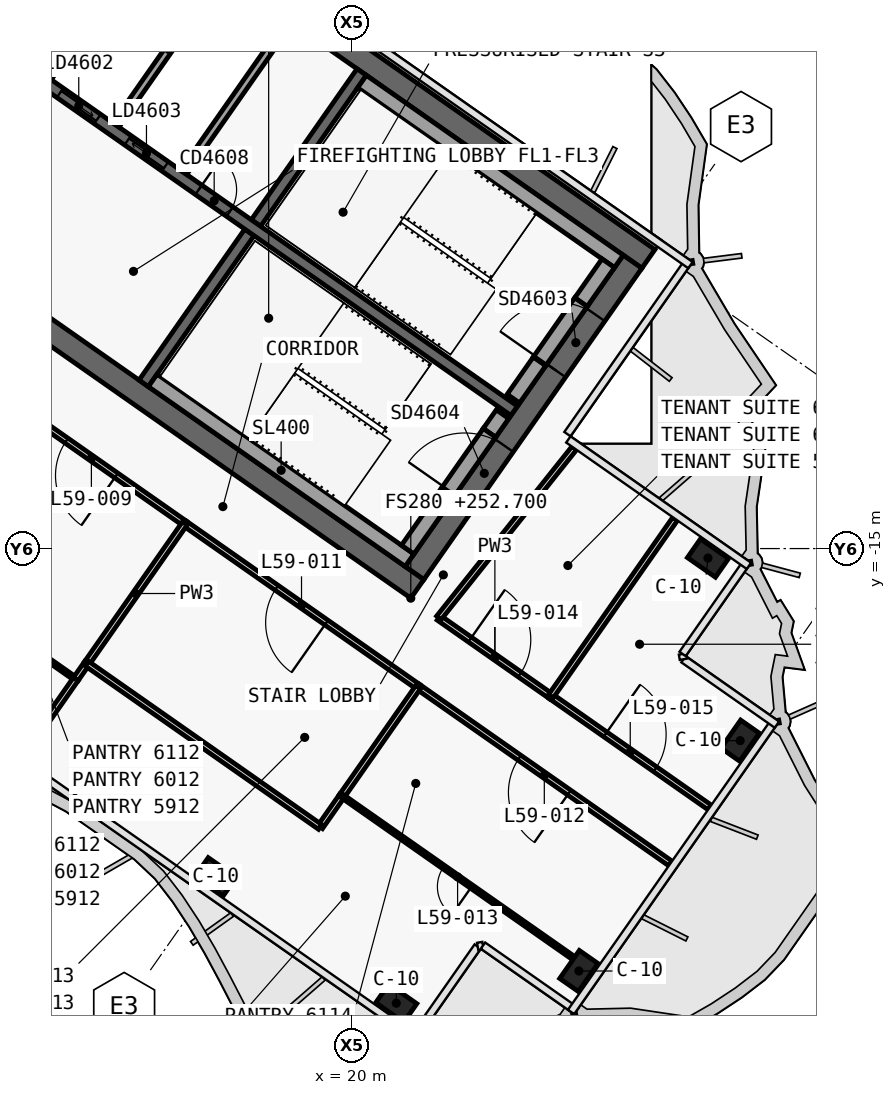
"""IFC4 building model, lengths in metres.
Left out: names, types, materials, properties, quantities, classifications, styles, units other than length and angle.
Written with IfcOpenShell. Run it as: python <this file> out.ifc"""

import sys

from ifc_helpers import new_model, si_unit, direction, frame, frame_2d, origin, origin_2d, place, context, subcontext, project, spatial, polyline, rectangle, outline, extrude, element, fill, save


model = new_model("IFC4")
c1 = context("Model", 3, precision=1e-05, world=origin(), true_north=direction((0.0, 1.0)))
c2 = subcontext(c1, "Body", "Model", "MODEL_VIEW")
j1 = project(units=[si_unit("LENGTHUNIT", "METRE"), si_unit("PLANEANGLEUNIT", "RADIAN")], contexts=[c1])
p1 = place(None, origin())
s1 = spatial("IfcSite", under=j1, at=p1, CompositionType="ELEMENT")
p2 = place(p1, origin())
s2 = spatial("IfcBuilding", under=s1, at=p2, CompositionType="ELEMENT")
p3 = place(p2, frame((0.0, 0.0, 252.7)))
s3 = spatial("IfcBuildingStorey", under=s2, at=p3, CompositionType="ELEMENT", Elevation=252.7)
p4 = place(p3, frame((0.028, 12.066, 0.0), z_axis=(0.0, 0.0, 1.0), x_axis=(0.819151382952, -0.573577380837, 0.0)))
e1 = element("IfcWall", 1, at=p4, inside=s3, PredefinedType="SHEAR", context=c2, shape_type="SweptSolid", body=[
    extrude(outline(polyline([(33.898, 0.3), (0.0, 0.3), (0.42, -0.3), (33.898, -0.3), (33.898, 0.3)])), origin(), (0.0, 0.0, 1.0), 3.9),
])
p5 = place(p3, frame((0.028, -0.874, 0.0), z_axis=(0.0, 0.0, 1.0), x_axis=(0.819150035022, -0.573579305871, 0.0)))
e2 = element("IfcWall", 2, at=p5, inside=s3, PredefinedType="SHEAR", context=c2, shape_type="SweptSolid", body=[
    extrude(outline(polyline([(26.476, 0.3), (0.0, 0.3), (0.42, -0.3), (26.476, -0.3), (26.476, 0.3)])), origin(), (0.0, 0.0, 1.0), 3.9),
])
p6 = place(p5, frame((0.826, 0.0, 0.0)))
e3 = element("IfcOpeningElement", 3, at=p6, cuts=e2, PredefinedType="OPENING", context=c2, shape_type="SweptSolid", body=[
    extrude(rectangle(XDim=1.5, YDim=2.1, at=frame_2d((0.75, 1.05))), frame((0.0, 0.31, 0.0), z_axis=(0.0, -1.0, 0.0), x_axis=(1.0, 0.0, 0.0)), (0.0, 0.0, 1.0), 0.62),
])
p7 = place(p5, frame((12.226, 0.0, 0.0)))
e4 = element("IfcOpeningElement", 4, at=p7, cuts=e2, PredefinedType="OPENING", context=c2, shape_type="SweptSolid", body=[
    extrude(rectangle(XDim=1.5, YDim=2.1, at=frame_2d((0.75, 1.05))), frame((0.0, 0.31, 0.0), z_axis=(0.0, -1.0, 0.0), x_axis=(1.0, 0.0, 0.0)), (0.0, 0.0, 1.0), 0.62),
])
p8 = place(p3, frame((21.642, -15.642, 0.0), z_axis=(0.0, 0.0, 1.0), x_axis=(0.573586866468, 0.819144740944, 0.0)))
e5 = element("IfcWall", 5, at=p8, inside=s3, PredefinedType="SHEAR", context=c2, shape_type="SweptSolid", body=[
    extrude(outline(polyline([(10.0, 0.3), (0.0, 0.3), (0.0, -0.3), (10.0, -0.3), (10.0, 0.3)])), origin(), (0.0, 0.0, 1.0), 3.9),
])
p9 = place(p8, frame((6.5, 0.0, 0.0)))
e6 = element("IfcOpeningElement", 6, at=p9, cuts=e5, PredefinedType="OPENING", context=c2, shape_type="SweptSolid", body=[
    extrude(rectangle(XDim=1.8, YDim=2.1, at=frame_2d((0.9, 1.05))), frame((0.0, 0.31, 0.0), z_axis=(0.0, -1.0, 0.0), x_axis=(1.0, 0.0, 0.0)), (0.0, 0.0, 1.0), 0.62),
])
p10 = place(p8, frame((2.3, 0.0, 0.0)))
e7 = element("IfcOpeningElement", 7, at=p10, cuts=e5, PredefinedType="OPENING", context=c2, shape_type="SweptSolid", body=[
    extrude(rectangle(XDim=1.8, YDim=2.1, at=frame_2d((0.9, 1.05))), frame((0.0, 0.31, 0.0), z_axis=(0.0, -1.0, 0.0), x_axis=(1.0, 0.0, 0.0)), (0.0, 0.0, 1.0), 0.62),
])
p11 = place(p3, frame((14.515, -10.652, 0.0), z_axis=(0.0, 0.0, 1.0), x_axis=(0.573560315113, 0.819163332265, 0.0)))
e8 = element("IfcWall", 8, at=p11, inside=s3, PredefinedType="SHEAR", context=c2, shape_type="SweptSolid", body=[
    extrude(outline(polyline([(0.0, 0.15), (0.0, -0.15), (4.85, -0.15), (4.85, 0.15), (0.0, 0.15)])), origin(), (0.0, 0.0, 1.0), 3.9),
])
p12 = place(p3, frame((17.469, -6.433, 0.0), z_axis=(0.0, 0.0, 1.0), x_axis=(0.573594092424, 0.81913968109, 0.0)))
e9 = element("IfcWall", 9, at=p12, inside=s3, PredefinedType="SHEAR", context=c2, shape_type="SweptSolid", body=[
    extrude(outline(polyline([(4.85, -0.15), (4.85, 0.15), (0.0, 0.15), (0.0, -0.15), (4.85, -0.15)])), origin(), (0.0, 0.0, 1.0), 3.9),
])
p13 = place(p3, frame((2.638, 3.768, 0.0), z_axis=(0.0, 0.0, 1.0), x_axis=(0.819155014212, -0.573572194837, 0.0)))
e10 = element("IfcWall", 10, at=p13, inside=s3, PredefinedType="SHEAR", context=c2, shape_type="SweptSolid", body=[
    extrude(outline(polyline([(0.0, 0.15), (0.0, -0.15), (26.4, -0.15), (26.4, 0.15), (0.0, 0.15)])), origin(), (0.0, 0.0, 1.0), 3.9),
])
p14 = place(p13, frame((9.637, 0.0, 0.0)))
e11 = element("IfcOpeningElement", 11, at=p14, cuts=e10, PredefinedType="OPENING", context=c2, shape_type="SweptSolid", body=[
    extrude(rectangle(XDim=1.2, YDim=2.1, at=frame_2d((0.6, 1.05))), frame((0.0, 0.16, 0.0), z_axis=(0.0, -1.0, 0.0), x_axis=(1.0, 0.0, 0.0)), (0.0, 0.0, 1.0), 0.32),
])
p15 = place(p13, frame((11.812, 0.0, 0.0)))
e12 = element("IfcOpeningElement", 12, at=p15, cuts=e10, PredefinedType="OPENING", context=c2, shape_type="SweptSolid", body=[
    extrude(rectangle(XDim=1.2, YDim=2.1, at=frame_2d((0.6, 1.05))), frame((0.0, 0.16, 0.0), z_axis=(0.0, -1.0, 0.0), x_axis=(1.0, 0.0, 0.0)), (0.0, 0.0, 1.0), 0.32),
])
p16 = place(p13, frame((13.988, 0.0, 0.0)))
e13 = element("IfcOpeningElement", 13, at=p16, cuts=e10, PredefinedType="OPENING", context=c2, shape_type="SweptSolid", body=[
    extrude(rectangle(XDim=1.2, YDim=2.1, at=frame_2d((0.6, 1.05))), frame((0.0, 0.16, 0.0), z_axis=(0.0, -1.0, 0.0), x_axis=(1.0, 0.0, 0.0)), (0.0, 0.0, 1.0), 0.32),
])
p17 = place(p13, frame((16.262, 0.0, 0.0)))
e14 = element("IfcOpeningElement", 14, at=p17, cuts=e10, PredefinedType="OPENING", context=c2, shape_type="SweptSolid", body=[
    extrude(rectangle(XDim=1.0, YDim=2.1, at=frame_2d((0.5, 1.05))), frame((0.0, 0.16, 0.0), z_axis=(0.0, -1.0, 0.0), x_axis=(1.0, 0.0, 0.0)), (0.0, 0.0, 1.0), 0.32),
])
for number, where, z_axis, x_axis in (
    (15, (16.41, -23.637, 0.0), (0.0, 0.0, 1.0), (0.819, -0.574, 0.0)),
    (16, (21.161, -26.964, 0.0), (0.0, 0.0, 1.0), (0.819, -0.574, 0.0)),
    (17, (29.363, -15.25, 0.0), (0.0, 0.0, 1.0), (0.819, -0.574, 0.0)),
    (18, (25.966, -26.117, 0.0), (0.0, 0.0, 1.0), (0.574, 0.819, 0.0)),
    (19, (30.21, -20.055, 0.0), (0.0, 0.0, 1.0), (0.574, 0.819, 0.0)),
):
    element("IfcColumn", number, at=place(p3, frame(where, z_axis=z_axis, x_axis=x_axis)), inside=s3, PredefinedType="COLUMN", context=c2, shape_type="SweptSolid", body=[
        extrude(rectangle(XDim=0.9, YDim=0.6, at=origin_2d()), origin(), (0.0, 0.0, 1.0), 3.9),
    ])
p18 = place(p3, frame((12.001, -2.605, 0.0), z_axis=(0.0, 0.0, 1.0), x_axis=(0.573560315113, 0.819163332265, 0.0)))
e20 = element("IfcWall", 20, at=p18, inside=s3, PredefinedType="SOLIDWALL", context=c2, shape_type="SweptSolid", body=[
    extrude(rectangle(XDim=4.85, YDim=0.2, at=frame_2d((2.425, 0.0))), origin(), (0.0, 0.0, 1.0), 3.9),
])
p19 = place(p3, frame((13.783, -3.852, 0.0), z_axis=(0.0, 0.0, 1.0), x_axis=(0.573594092424, 0.81913968109, 0.0)))
e21 = element("IfcWall", 21, at=p19, inside=s3, PredefinedType="SOLIDWALL", context=c2, shape_type="SweptSolid", body=[
    extrude(rectangle(XDim=4.85, YDim=0.2, at=frame_2d((2.425, 0.0))), origin(), (0.0, 0.0, 1.0), 3.9),
])
p20 = place(p3, frame((15.565, -5.1, 0.0), z_axis=(0.0, 0.0, 1.0), x_axis=(0.573560315113, 0.819163332265, 0.0)))
e22 = element("IfcWall", 22, at=p20, inside=s3, PredefinedType="SOLIDWALL", context=c2, shape_type="SweptSolid", body=[
    extrude(rectangle(XDim=4.85, YDim=0.2, at=frame_2d((2.425, 0.0))), origin(), (0.0, 0.0, 1.0), 3.9),
])
p21 = place(p3, frame((20.259, -2.71, 0.0), z_axis=(0.0, 0.0, 1.0), x_axis=(0.81914849389, -0.573581506813, 0.0)))
e23 = element("IfcWall", 23, at=p21, inside=s3, PredefinedType="SOLIDWALL", context=c2, shape_type="SweptSolid", body=[
    extrude(rectangle(XDim=8.25, YDim=0.4, at=frame_2d((4.125, 0.0))), origin(), (0.0, 0.0, 1.0), 3.62),
])
p22 = place(p3, frame((24.244, -11.055, 0.0), z_axis=(0.0, 0.0, 1.0), x_axis=(0.573571582932, 0.819155442668, 0.0)))
e24 = element("IfcWall", 24, at=p22, inside=s3, PredefinedType="SOLIDWALL", context=c2, shape_type="SweptSolid", body=[
    extrude(rectangle(XDim=1.2, YDim=0.4, at=frame_2d((0.6, 0.0))), origin(), (0.0, 0.0, 1.0), 3.62),
])
p23 = place(p3, frame((26.022, -8.515, 0.0), z_axis=(0.0, 0.0, 1.0), x_axis=(0.573619628835, 0.819121798889, 0.0)))
e25 = element("IfcWall", 25, at=p23, inside=s3, PredefinedType="SOLIDWALL", context=c2, shape_type="SweptSolid", body=[
    extrude(rectangle(XDim=1.25, YDim=0.4, at=frame_2d((0.625, 0.0))), origin(), (0.0, 0.0, 1.0), 3.62),
])
p24 = place(p3, frame((24.932, -10.072, 2.15), z_axis=(0.0, 0.0, 1.0), x_axis=(0.573591692345, 0.819141361715, 0.0)))
e26 = element("IfcWall", 26, at=p24, inside=s3, PredefinedType="SOLIDWALL", context=c2, shape_type="SweptSolid", body=[
    extrude(rectangle(XDim=1.9, YDim=0.4, at=frame_2d((0.95, 0.0))), origin(), (0.0, 0.0, 1.0), 1.47),
])
p25 = place(p3, frame((14.753, -10.574, 0.0), z_axis=(0.0, 0.0, 1.0), x_axis=(0.819158229677, -0.573567602601, 0.0)))
e27 = element("IfcWall", 27, at=p25, inside=s3, PredefinedType="SOLIDWALL", context=c2, shape_type="SweptSolid", body=[
    extrude(rectangle(XDim=8.25, YDim=0.4, at=frame_2d((4.125, 0.0))), origin(), (0.0, 0.0, 1.0), 3.62),
])
p26 = place(p3, frame((21.462, -15.028, 0.0), z_axis=(0.0, 0.0, 1.0), x_axis=(0.573559770908, 0.819163713305, 0.0)))
e28 = element("IfcWall", 28, at=p26, inside=s3, PredefinedType="SOLIDWALL", context=c2, shape_type="SweptSolid", body=[
    extrude(rectangle(XDim=1.85, YDim=0.4, at=frame_2d((0.925, 0.0))), origin(), (0.0, 0.0, 1.0), 3.62),
])
p27 = place(p3, frame((23.613, -11.956, 0.0), z_axis=(0.0, 0.0, 1.0), x_axis=(0.573435029941, 0.819251039936, 0.0)))
e29 = element("IfcWall", 29, at=p27, inside=s3, PredefinedType="SOLIDWALL", context=c2, shape_type="SweptSolid", body=[
    extrude(rectangle(XDim=0.6, YDim=0.4, at=frame_2d((0.3, 0.0))), origin(), (0.0, 0.0, 1.0), 3.62),
])
p28 = place(p3, frame((22.523, -13.512, 2.15), z_axis=(0.0, 0.0, 1.0), x_axis=(0.573591692345, 0.819141361715, 0.0)))
e30 = element("IfcWall", 30, at=p28, inside=s3, PredefinedType="SOLIDWALL", context=c2, shape_type="SweptSolid", body=[
    extrude(rectangle(XDim=1.9, YDim=0.4, at=frame_2d((0.95, 0.0))), origin(), (0.0, 0.0, 1.0), 1.47),
])
p29 = place(p3, frame((22.281, -16.822, 0.0), z_axis=(0.0, 0.0, 1.0), x_axis=(0.819165052243, -0.573557858619, 0.0)))
e31 = element("IfcWall", 31, at=p29, inside=s3, PredefinedType="PARTITIONING", context=c2, shape_type="SweptSolid", body=[
    extrude(rectangle(XDim=3.602, YDim=0.15, at=frame_2d((1.801, 0.0))), origin(), (0.0, 0.0, 1.0), 3.62),
])
p30 = place(p29, frame((1.001, 0.0, 0.0)))
e32 = element("IfcOpeningElement", 32, at=p30, cuts=e31, PredefinedType="OPENING", context=c2, shape_type="SweptSolid", body=[
    extrude(rectangle(XDim=1.6, YDim=2.1, at=frame_2d((0.8, 1.05))), frame((0.0, 0.085, 0.0), z_axis=(0.0, -1.0, 0.0), x_axis=(1.0, 0.0, 0.0)), (0.0, 0.0, 1.0), 0.17),
])
p31 = place(p3, frame((25.228, -18.886, 0.0), z_axis=(0.0, 0.0, 1.0), x_axis=(0.819171218287, -0.57354905207, 0.0)))
e33 = element("IfcWall", 33, at=p31, inside=s3, PredefinedType="PARTITIONING", context=c2, shape_type="SweptSolid", body=[
    extrude(rectangle(XDim=5.102, YDim=0.15, at=frame_2d((2.551, 0.0))), origin(), (0.0, 0.0, 1.0), 3.0),
])
p32 = place(p31, frame((1.751, 0.0, 0.0)))
e34 = element("IfcOpeningElement", 34, at=p32, cuts=e33, PredefinedType="OPENING", context=c2, shape_type="SweptSolid", body=[
    extrude(rectangle(XDim=1.6, YDim=2.1, at=frame_2d((0.8, 1.05))), frame((0.0, 0.085, 0.0), z_axis=(0.0, -1.0, 0.0), x_axis=(1.0, 0.0, 0.0)), (0.0, 0.0, 1.0), 0.17),
])
p33 = place(p3, frame((15.598, -14.34, 0.0), z_axis=(0.0, 0.0, 1.0), x_axis=(-0.819145946981, 0.573585144111, 0.0)))
e35 = element("IfcWall", 35, at=p33, inside=s3, PredefinedType="PARTITIONING", context=c2, shape_type="SweptSolid", body=[
    extrude(rectangle(XDim=6.004, YDim=0.15, at=frame_2d((3.002, 0.0))), origin(), (0.0, 0.0, 1.0), 3.05),
])
p34 = place(p33, frame((2.202, 0.0, 0.0)))
e36 = element("IfcOpeningElement", 36, at=p34, cuts=e35, PredefinedType="OPENING", context=c2, shape_type="SweptSolid", body=[
    extrude(rectangle(XDim=1.6, YDim=2.1, at=frame_2d((0.8, 1.05))), frame((0.0, 0.085, 0.0), z_axis=(0.0, -1.0, 0.0), x_axis=(1.0, 0.0, 0.0)), (0.0, 0.0, 1.0), 0.17),
])
p35 = place(p3, frame((21.741, -18.642, 0.0), z_axis=(0.0, 0.0, 1.0), x_axis=(-0.819164661457, 0.573558416746, 0.0)))
e37 = element("IfcWall", 37, at=p35, inside=s3, PredefinedType="PARTITIONING", context=c2, shape_type="SweptSolid", body=[
    extrude(rectangle(XDim=7.504, YDim=0.15, at=frame_2d((3.752, 0.0))), origin(), (0.0, 0.0, 1.0), 3.05),
])
p36 = place(p35, frame((2.952, 0.0, 0.0)))
e38 = element("IfcOpeningElement", 38, at=p36, cuts=e37, PredefinedType="OPENING", context=c2, shape_type="SweptSolid", body=[
    extrude(rectangle(XDim=1.6, YDim=2.1, at=frame_2d((0.8, 1.05))), frame((0.0, 0.085, 0.0), z_axis=(0.0, -1.0, 0.0), x_axis=(1.0, 0.0, 0.0)), (0.0, 0.0, 1.0), 0.17),
])
p37 = place(p3, frame((28.375, -23.287, 0.0), z_axis=(0.0, 0.0, 1.0), x_axis=(-0.819144140048, 0.573587724611, 0.0)))
e39 = element("IfcWall", 39, at=p37, inside=s3, PredefinedType="PARTITIONING", context=c2, shape_type="SweptSolid", body=[
    extrude(rectangle(XDim=8.102, YDim=0.15, at=frame_2d((4.051, 0.0))), origin(), (0.0, 0.0, 1.0), 3.0),
])
p38 = place(p37, frame((3.251, 0.0, 0.0)))
e40 = element("IfcOpeningElement", 40, at=p38, cuts=e39, PredefinedType="OPENING", context=c2, shape_type="SweptSolid", body=[
    extrude(rectangle(XDim=1.6, YDim=2.1, at=frame_2d((0.8, 1.05))), frame((0.0, 0.085, 0.0), z_axis=(0.0, -1.0, 0.0), x_axis=(1.0, 0.0, 0.0)), (0.0, 0.0, 1.0), 0.17),
])
p39 = place(p3, frame((28.499, -14.218, 0.0), z_axis=(0.0, 0.0, 1.0), x_axis=(-0.573562952056, -0.819161485929, 0.0)))
e41 = element("IfcWall", 41, at=p39, inside=s3, PredefinedType="PARTITIONING", context=c2, shape_type="SweptSolid", body=[
    extrude(rectangle(XDim=5.7, YDim=0.15, at=frame_2d((2.85, 0.0))), origin(), (0.0, 0.0, 1.0), 3.05),
])
p40 = place(p3, frame((22.282, -16.823, 0.0), z_axis=(0.0, 0.0, 1.0), x_axis=(0.623563137477, 0.781772993637, 0.0)))
e42 = element("IfcWall", 42, at=p40, inside=s3, PredefinedType="PARTITIONING", context=c2, shape_type="SweptSolid", body=[
    extrude(rectangle(XDim=5.711, YDim=0.15, at=frame_2d((2.855, 0.0))), origin(), (0.0, 0.0, 1.0), 3.05),
])
p41 = place(p3, frame((12.728, -18.435, 0.0), z_axis=(0.0, 0.0, 1.0), x_axis=(-0.819163097304, 0.573560650686, 0.0)))
e43 = element("IfcWall", 43, at=p41, inside=s3, PredefinedType="PARTITIONING", context=c2, shape_type="SweptSolid", body=[
    extrude(rectangle(XDim=6.0, YDim=0.1, at=frame_2d((3.0, 0.0))), origin(), (0.0, 0.0, 1.0), 3.05),
])
p42 = place(p41, frame((2.55, 0.0, 0.0)))
e44 = element("IfcOpeningElement", 44, at=p42, cuts=e43, PredefinedType="OPENING", context=c2, shape_type="SweptSolid", body=[
    extrude(rectangle(XDim=0.9, YDim=2.1, at=frame_2d((0.45, 1.05))), frame((0.0, 0.06, 0.0), z_axis=(0.0, -1.0, 0.0), x_axis=(1.0, 0.0, 0.0)), (0.0, 0.0, 1.0), 0.12),
])
p43 = place(p3, frame((12.728, -18.435, 0.0), z_axis=(0.0, 0.0, 1.0), x_axis=(-0.573560689761, -0.819163069945, 0.0)))
e45 = element("IfcWall", 45, at=p43, inside=s3, PredefinedType="PARTITIONING", context=c2, shape_type="SweptSolid", body=[
    extrude(rectangle(XDim=2.499, YDim=0.15, at=frame_2d((1.25, 0.0))), origin(), (0.0, 0.0, 1.0), 3.0),
])
p44 = place(p3, frame((15.596, -14.339, 0.0), z_axis=(0.0, 0.0, 1.0), x_axis=(-0.573564243949, -0.819160581365, 0.0)))
e46 = element("IfcWall", 46, at=p44, inside=s3, PredefinedType="PARTITIONING", context=c2, shape_type="SweptSolid", body=[
    extrude(rectangle(XDim=4.502, YDim=0.15, at=frame_2d((2.251, 0.0))), origin(), (0.0, 0.0, 1.0), 3.62),
])
p45 = place(p3, frame((13.016, -18.024, 0.0), z_axis=(0.0, 0.0, 1.0), x_axis=(-0.573560455774, -0.819163233777, 0.0)))
e47 = element("IfcWall", 47, at=p45, inside=s3, PredefinedType="PARTITIONING", context=c2, shape_type="SweptSolid", body=[
    extrude(rectangle(XDim=0.501, YDim=0.15, at=frame_2d((0.25, 0.0))), origin(), (0.0, 0.0, 1.0), 3.62),
])
p46 = place(p3, frame((19.733, -21.507, 0.0), z_axis=(0.0, 0.0, 1.0), x_axis=(-0.573691505171, -0.819071460188, 0.0)))
e48 = element("IfcWall", 48, at=p46, inside=s3, PredefinedType="PARTITIONING", context=c2, shape_type="SweptSolid", body=[
    extrude(rectangle(XDim=1.001, YDim=0.15, at=frame_2d((0.5, 0.0))), origin(), (0.0, 0.0, 1.0), 3.62),
])
p47 = place(p3, frame((19.159, -22.327, 0.0), z_axis=(0.0, 0.0, 1.0), x_axis=(-0.81915238829, 0.573575945067, 0.0)))
e49 = element("IfcWall", 49, at=p47, inside=s3, PredefinedType="PARTITIONING", context=c2, shape_type="SweptSolid", body=[
    extrude(rectangle(XDim=7.5, YDim=0.15, at=frame_2d((3.75, 0.0))), origin(), (0.0, 0.0, 1.0), 3.05),
])
p48 = place(p3, frame((21.74, -18.641, 0.0), z_axis=(0.0, 0.0, 1.0), x_axis=(-0.573555919535, -0.819166409935, 0.0)))
e50 = element("IfcWall", 50, at=p48, inside=s3, PredefinedType="PARTITIONING", context=c2, shape_type="SweptSolid", body=[
    extrude(rectangle(XDim=3.502, YDim=0.15, at=frame_2d((1.751, 0.0))), origin(), (0.0, 0.0, 1.0), 3.05),
])
p49 = place(p3, frame((25.818, -25.77, 0.0), z_axis=(0.0, 0.0, 1.0), x_axis=(-0.819154729426, 0.573572601559, 0.0)))
e51 = element("IfcWall", 51, at=p49, inside=s3, PredefinedType="PARTITIONING", context=c2, shape_type="SweptSolid", body=[
    extrude(rectangle(XDim=7.43, YDim=0.1, at=frame_2d((3.715, 0.0))), origin(), (0.0, 0.0, 1.0), 3.05),
])
p50 = place(p49, frame((3.265, 0.0, 0.0)))
e52 = element("IfcOpeningElement", 52, at=p50, cuts=e51, PredefinedType="OPENING", context=c2, shape_type="SweptSolid", body=[
    extrude(rectangle(XDim=0.9, YDim=2.1, at=frame_2d((0.45, 1.05))), frame((0.0, 0.06, 0.0), z_axis=(0.0, -1.0, 0.0), x_axis=(1.0, 0.0, 0.0)), (0.0, 0.0, 1.0), 0.12),
])
p51 = place(p15, origin())
e53 = element("IfcDoor", 53, at=p51, inside=s3, OperationType="SLIDING_TO_RIGHT", PredefinedType="DOOR", context=c2, shape_type="SweptSolid", body=[
    extrude(rectangle(XDim=1.2, YDim=2.1, at=frame_2d((0.6, 1.05))), frame((0.0, 0.025, 0.0), z_axis=(0.0, -1.0, 0.0), x_axis=(1.0, 0.0, 0.0)), (0.0, 0.0, 1.0), 0.05),
])
fill(e12, e53)
p52 = place(p16, origin())
e54 = element("IfcDoor", 54, at=p52, inside=s3, OperationType="SLIDING_TO_LEFT", PredefinedType="DOOR", context=c2, shape_type="SweptSolid", body=[
    extrude(rectangle(XDim=1.2, YDim=2.1, at=frame_2d((0.6, 1.05))), frame((0.0, 0.025, 0.0), z_axis=(0.0, -1.0, 0.0), x_axis=(1.0, 0.0, 0.0)), (0.0, 0.0, 1.0), 0.05),
])
fill(e13, e54)
p53 = place(p17, origin())
e55 = element("IfcDoor", 55, at=p53, inside=s3, OperationType="SINGLE_SWING_RIGHT", PredefinedType="DOOR", context=c2, shape_type="SweptSolid", body=[
    extrude(rectangle(XDim=1.0, YDim=2.1, at=frame_2d((0.5, 1.05))), frame((0.0, 0.025, 0.0), z_axis=(0.0, -1.0, 0.0), x_axis=(1.0, 0.0, 0.0)), (0.0, 0.0, 1.0), 0.05),
])
fill(e14, e55)
p54 = place(p9, origin())
e56 = element("IfcDoor", 56, at=p54, inside=s3, OperationType="DOUBLE_DOOR_SINGLE_SWING", PredefinedType="DOOR", context=c2, shape_type="SweptSolid", body=[
    extrude(rectangle(XDim=1.8, YDim=2.1, at=frame_2d((0.9, 1.05))), frame((0.0, 0.025, 0.0), z_axis=(0.0, -1.0, 0.0), x_axis=(1.0, 0.0, 0.0)), (0.0, 0.0, 1.0), 0.05),
])
fill(e6, e56)
p55 = place(p10, origin())
e57 = element("IfcDoor", 57, at=p55, inside=s3, OperationType="DOUBLE_DOOR_SINGLE_SWING", PredefinedType="DOOR", context=c2, shape_type="SweptSolid", body=[
    extrude(rectangle(XDim=1.8, YDim=2.1, at=frame_2d((0.9, 1.05))), frame((0.0, 0.025, 0.0), z_axis=(0.0, -1.0, 0.0), x_axis=(1.0, 0.0, 0.0)), (0.0, 0.0, 1.0), 0.05),
])
fill(e7, e57)
p56 = place(p34, origin())
e58 = element("IfcDoor", 58, at=p56, inside=s3, OperationType="DOUBLE_DOOR_SINGLE_SWING", PredefinedType="DOOR", context=c2, shape_type="SweptSolid", body=[
    extrude(rectangle(XDim=1.6, YDim=2.1, at=frame_2d((0.8, 1.05))), frame((0.0, 0.025, 0.0), z_axis=(0.0, -1.0, 0.0), x_axis=(1.0, 0.0, 0.0)), (0.0, 0.0, 1.0), 0.05),
])
fill(e36, e58)
p57 = place(p36, origin())
e59 = element("IfcDoor", 59, at=p57, inside=s3, OperationType="DOUBLE_DOOR_SINGLE_SWING", PredefinedType="DOOR", context=c2, shape_type="SweptSolid", body=[
    extrude(rectangle(XDim=1.6, YDim=2.1, at=frame_2d((0.8, 1.05))), frame((0.0, 0.025, 0.0), z_axis=(0.0, -1.0, 0.0), x_axis=(1.0, 0.0, 0.0)), (0.0, 0.0, 1.0), 0.05),
])
fill(e38, e59)
p58 = place(p38, origin())
e60 = element("IfcDoor", 60, at=p58, inside=s3, OperationType="DOUBLE_DOOR_SINGLE_SWING", PredefinedType="DOOR", context=c2, shape_type="SweptSolid", body=[
    extrude(rectangle(XDim=1.6, YDim=2.1, at=frame_2d((0.8, 1.05))), frame((0.0, 0.025, 0.0), z_axis=(0.0, -1.0, 0.0), x_axis=(1.0, 0.0, 0.0)), (0.0, 0.0, 1.0), 0.05),
])
fill(e40, e60)
p59 = place(p50, origin())
e61 = element("IfcDoor", 61, at=p59, inside=s3, OperationType="SINGLE_SWING_RIGHT", PredefinedType="DOOR", context=c2, shape_type="SweptSolid", body=[
    extrude(rectangle(XDim=0.9, YDim=2.1, at=frame_2d((0.45, 1.05))), frame((0.0, 0.025, 0.0), z_axis=(0.0, -1.0, 0.0), x_axis=(1.0, 0.0, 0.0)), (0.0, 0.0, 1.0), 0.05),
])
fill(e52, e61)
p60 = place(p30, origin())
e62 = element("IfcDoor", 62, at=p60, inside=s3, OperationType="DOUBLE_DOOR_SINGLE_SWING", PredefinedType="DOOR", context=c2, shape_type="SweptSolid", body=[
    extrude(rectangle(XDim=1.6, YDim=2.1, at=frame_2d((0.8, 1.05))), frame((0.0, 0.025, 0.0), z_axis=(0.0, -1.0, 0.0), x_axis=(1.0, 0.0, 0.0)), (0.0, 0.0, 1.0), 0.05),
])
fill(e32, e62)
p61 = place(p32, origin())
e63 = element("IfcDoor", 63, at=p61, inside=s3, OperationType="DOUBLE_DOOR_SINGLE_SWING", PredefinedType="DOOR", context=c2, shape_type="SweptSolid", body=[
    extrude(rectangle(XDim=1.6, YDim=2.1, at=frame_2d((0.8, 1.05))), frame((0.0, 0.025, 0.0), z_axis=(0.0, -1.0, 0.0), x_axis=(1.0, 0.0, 0.0)), (0.0, 0.0, 1.0), 0.05),
])
fill(e34, e63)
save(model, sys.argv[1])
